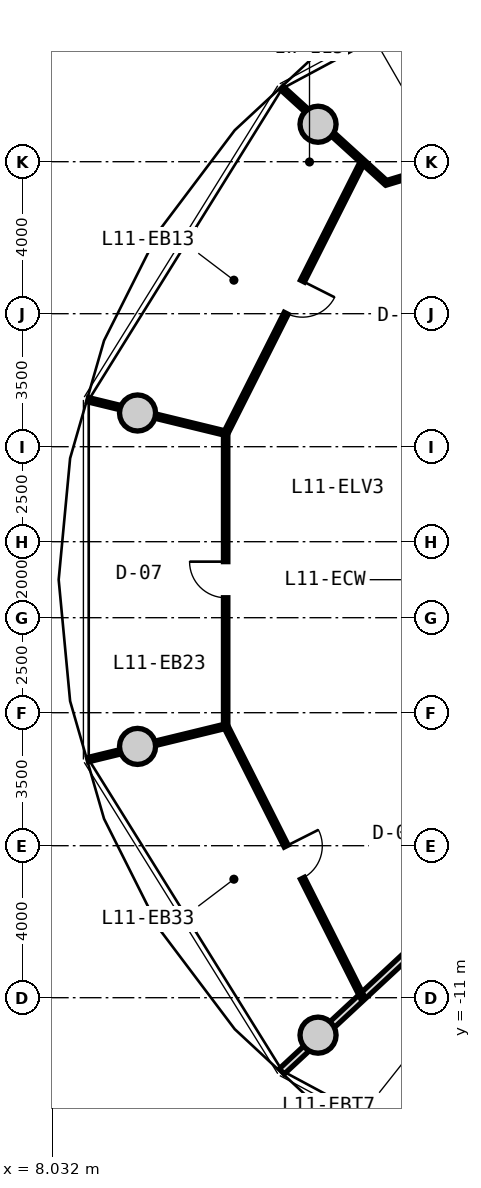
"""IFC4 building model, lengths in metres.
Left out: names, types, materials, properties, quantities, classifications, styles, units other than length and angle.
Written with IfcOpenShell. Run it as: python <this file> out.ifc"""

import sys

from ifc_helpers import new_model, si_unit, direction, frame, frame_2d, origin, origin_2d, place, context, subcontext, project, spatial, rectangle, circle, extrude, source, transform, mapped, element, fill, save


model = new_model("IFC4")
c1 = context("Model", 3, precision=1e-05, world=origin(), true_north=direction((0.0, 1.0)))
c2 = subcontext(c1, "Body", "Model", "MODEL_VIEW")
j1 = project(units=[si_unit("LENGTHUNIT", "METRE"), si_unit("PLANEANGLEUNIT", "RADIAN")], contexts=[c1])
p1 = place(None, origin())
s1 = spatial("IfcSite", under=j1, at=p1, CompositionType="ELEMENT")
p2 = place(p1, origin())
s2 = spatial("IfcBuilding", under=s1, at=p2, CompositionType="ELEMENT")
p3 = place(p2, frame((0.0, 0.0, 39.9)))
s3 = spatial("IfcBuildingStorey", under=s2, at=p3, CompositionType="ELEMENT", Elevation=39.9)
m1 = source(origin(), c2, "Body", "SweptSolid", [
    extrude(circle(Radius=0.475, at=origin_2d()), origin(), (0.0, 0.0, 1.0), 3.05),
])
for number, where, z_axis, x_axis in (
    (1, (15.025, 11.985, 0.0), (0.0, 0.0, 1.0), (1.0, 0.0, 0.0)),
    (2, (10.275, 4.387, 0.0), (0.0, 0.0, 1.0), (1.0, 0.0, 0.0)),
    (3, (10.275, -4.387, 0.0), (0.0, 0.0, 1.0), (1.0, 0.0, 0.0)),
    (4, (15.025, -11.985, 0.0), (0.0, 0.0, 1.0), (1.0, 0.0, 0.0)),
):
    element("IfcColumn", number, at=place(p3, frame(where, z_axis=z_axis, x_axis=x_axis)), inside=s3, PredefinedType="COLUMN", context=c2, shape_type="MappedRepresentation", body=[
        mapped(m1, transform((0.0, 0.0, 0.0), x_axis=(1.0, 0.0, 0.0), y_axis=(0.0, 1.0, 0.0), z_axis=(0.0, 0.0, 1.0), scale=1.0)),
    ])
m2 = source(origin(), c2, "Body", "SweptSolid", [
    extrude(rectangle(XDim=7.435, YDim=0.19, at=frame_2d((3.717, 0.0))), origin(), (0.0, 0.0, 1.0), 2.225),
])
p4 = place(p3, frame((19.517, -7.88, 0.0), z_axis=(0.0, 0.0, 1.0), x_axis=(-0.732651956848, -0.680603489652, 0.0)))
e5 = element("IfcWall", 5, at=p4, inside=s3, PredefinedType="PARTITIONING", context=c2, shape_type="MappedRepresentation", body=[
    mapped(m2, transform((0.0, 0.0, 0.0), x_axis=(1.0, 0.0, 0.0), y_axis=(0.0, 1.0, 0.0), z_axis=(0.0, 0.0, 1.0), scale=1.0)),
])
m3 = source(origin(), c2, "Body", "SweptSolid", [
    extrude(rectangle(XDim=8.018, YDim=0.115, at=frame_2d((4.009, 0.0))), origin(), (0.0, 0.0, 1.0), 2.775),
])
p5 = place(p3, frame((16.205, 11.014, 0.0), z_axis=(0.0, 0.0, 1.0), x_axis=(-0.450134355233, -0.89296084026, 0.0)))
e6 = element("IfcWall", 6, at=p5, inside=s3, PredefinedType="PARTITIONING", context=c2, shape_type="MappedRepresentation", body=[
    mapped(m3, transform((0.0, 0.0, 0.0), x_axis=(1.0, 0.0, 0.0), y_axis=(0.0, 1.0, 0.0), z_axis=(0.0, 0.0, 1.0), scale=1.0)),
])
p6 = place(p5, frame((3.534, 0.0, 0.0)))
e7 = element("IfcOpeningElement", 7, at=p6, cuts=e6, PredefinedType="OPENING", context=c2, shape_type="SweptSolid", body=[
    extrude(rectangle(XDim=0.95, YDim=2.1, at=frame_2d((0.475, 1.05))), frame((0.0, 0.067, 0.0), z_axis=(0.0, -1.0, 0.0), x_axis=(1.0, 0.0, 0.0)), (0.0, 0.0, 1.0), 0.135),
])
m4 = source(origin(), c2, "Body", "SweptSolid", [
    extrude(rectangle(XDim=3.7, YDim=0.115, at=frame_2d((1.85, 0.0))), origin(), (0.0, 0.0, 1.0), 2.225),
])
p7 = place(p3, frame((16.808, 10.451, 0.0), z_axis=(0.0, 0.0, 1.0), x_axis=(-0.739922161065, 0.672692497033, 0.0)))
e8 = element("IfcWall", 8, at=p7, inside=s3, PredefinedType="PARTITIONING", context=c2, shape_type="MappedRepresentation", body=[
    mapped(m4, transform((0.0, 0.0, 0.0), x_axis=(1.0, 0.0, 0.0), y_axis=(0.0, 1.0, 0.0), z_axis=(0.0, 0.0, 1.0), scale=1.0)),
])
m5 = source(origin(), c2, "Body", "SweptSolid", [
    extrude(rectangle(XDim=7.709, YDim=0.115, at=frame_2d((3.855, 0.0))), origin(), (0.0, 0.0, 1.0), 2.775),
])
p8 = place(p3, frame((12.594, 3.855, 0.0), z_axis=(0.0, 0.0, 1.0), x_axis=(0.0, -1.0, 0.0)))
e9 = element("IfcWall", 9, at=p8, inside=s3, PredefinedType="PARTITIONING", context=c2, shape_type="MappedRepresentation", body=[
    mapped(m5, transform((0.0, 0.0, 0.0), x_axis=(1.0, 0.0, 0.0), y_axis=(0.0, 1.0, 0.0), z_axis=(0.0, 0.0, 1.0), scale=1.0)),
])
p9 = place(p8, frame((3.38, 0.0, 0.0)))
e10 = element("IfcOpeningElement", 10, at=p9, cuts=e9, PredefinedType="OPENING", context=c2, shape_type="SweptSolid", body=[
    extrude(rectangle(XDim=0.95, YDim=2.1, at=frame_2d((0.475, 1.05))), frame((0.0, 0.067, 0.0), z_axis=(0.0, -1.0, 0.0), x_axis=(1.0, 0.0, 0.0)), (0.0, 0.0, 1.0), 0.135),
])
m6 = source(origin(), c2, "Body", "SweptSolid", [
    extrude(rectangle(XDim=3.728, YDim=0.115, at=frame_2d((1.864, 0.0))), origin(), (0.0, 0.0, 1.0), 2.225),
])
p10 = place(p3, frame((12.594, 3.855, 0.0), z_axis=(0.0, 0.0, 1.0), x_axis=(-0.971641177968, 0.236460189624, 0.0)))
e11 = element("IfcWall", 11, at=p10, inside=s3, PredefinedType="PARTITIONING", context=c2, shape_type="MappedRepresentation", body=[
    mapped(m6, transform((0.0, 0.0, 0.0), x_axis=(1.0, 0.0, 0.0), y_axis=(0.0, 1.0, 0.0), z_axis=(0.0, 0.0, 1.0), scale=1.0)),
])
p11 = place(p3, frame((12.596, -3.854, 0.0), z_axis=(0.0, 0.0, 1.0), x_axis=(0.450134355233, -0.89296084026, 0.0)))
e12 = element("IfcWall", 12, at=p11, inside=s3, PredefinedType="PARTITIONING", context=c2, shape_type="MappedRepresentation", body=[
    mapped(m3, transform((0.0, 0.0, 0.0), x_axis=(1.0, 0.0, 0.0), y_axis=(0.0, 1.0, 0.0), z_axis=(0.0, 0.0, 1.0), scale=1.0)),
])
p12 = place(p11, frame((3.534, 0.0, 0.0)))
e13 = element("IfcOpeningElement", 13, at=p12, cuts=e12, PredefinedType="OPENING", context=c2, shape_type="SweptSolid", body=[
    extrude(rectangle(XDim=0.95, YDim=2.1, at=frame_2d((0.475, 1.05))), frame((0.0, 0.067, 0.0), z_axis=(0.0, -1.0, 0.0), x_axis=(1.0, 0.0, 0.0)), (0.0, 0.0, 1.0), 0.135),
])
m7 = source(origin(), c2, "Body", "SweptSolid", [
    extrude(rectangle(XDim=3.73, YDim=0.115, at=frame_2d((1.865, 0.0))), origin(), (0.0, 0.0, 1.0), 2.225),
])
p13 = place(p3, frame((12.596, -3.854, 0.0), z_axis=(0.0, 0.0, 1.0), x_axis=(-0.971644038568, -0.236448434791, 0.0)))
e14 = element("IfcWall", 14, at=p13, inside=s3, PredefinedType="PARTITIONING", context=c2, shape_type="MappedRepresentation", body=[
    mapped(m7, transform((0.0, 0.0, 0.0), x_axis=(1.0, 0.0, 0.0), y_axis=(0.0, 1.0, 0.0), z_axis=(0.0, 0.0, 1.0), scale=1.0)),
])
m8 = source(origin(), c2, "Body", "SweptSolid", [
    extrude(rectangle(XDim=4.159, YDim=0.115, at=frame_2d((2.079, 0.0))), origin(), (0.0, 0.0, 1.0), 2.415),
])
p14 = place(p3, frame((20.796, 11.651, 0.0), z_axis=(0.0, 0.0, 1.0), x_axis=(-0.956846477815, -0.290593905466, 0.0)))
e15 = element("IfcWall", 15, at=p14, inside=s3, PredefinedType="PARTITIONING", context=c2, shape_type="MappedRepresentation", body=[
    mapped(m8, transform((0.0, 0.0, 0.0), x_axis=(1.0, 0.0, 0.0), y_axis=(0.0, 1.0, 0.0), z_axis=(0.0, 0.0, 1.0), scale=1.0)),
])
m9 = source(origin(), c2, "Body", "SweptSolid", [
    extrude(rectangle(XDim=0.95, YDim=2.1, at=frame_2d((0.475, 1.05))), frame((0.0, 0.025, 0.0), z_axis=(0.0, -1.0, 0.0), x_axis=(1.0, 0.0, 0.0)), (0.0, 0.0, 1.0), 0.05),
])
p15 = place(p6, origin())
e16 = element("IfcDoor", 16, at=p15, inside=s3, OperationType="SINGLE_SWING_LEFT", PredefinedType="DOOR", context=c2, shape_type="MappedRepresentation", body=[
    mapped(m9, transform((0.0, 0.0, 0.0), x_axis=(1.0, 0.0, 0.0), y_axis=(0.0, 1.0, 0.0), z_axis=(0.0, 0.0, 1.0), scale=1.0)),
])
fill(e7, e16)
p16 = place(p9, frame((0.95, 0.0, 0.0), z_axis=(0.0, 0.0, 1.0), x_axis=(-1.0, 0.0, 0.0)))
e17 = element("IfcDoor", 17, at=p16, inside=s3, OperationType="SINGLE_SWING_RIGHT", PredefinedType="DOOR", context=c2, shape_type="MappedRepresentation", body=[
    mapped(m9, transform((0.0, 0.0, 0.0), x_axis=(1.0, 0.0, 0.0), y_axis=(0.0, 1.0, 0.0), z_axis=(0.0, 0.0, 1.0), scale=1.0)),
])
fill(e10, e17)
p17 = place(p12, origin())
e18 = element("IfcDoor", 18, at=p17, inside=s3, OperationType="SINGLE_SWING_LEFT", PredefinedType="DOOR", context=c2, shape_type="MappedRepresentation", body=[
    mapped(m9, transform((0.0, 0.0, 0.0), x_axis=(1.0, 0.0, 0.0), y_axis=(0.0, 1.0, 0.0), z_axis=(0.0, 0.0, 1.0), scale=1.0)),
])
fill(e13, e18)
save(model, sys.argv[1])
